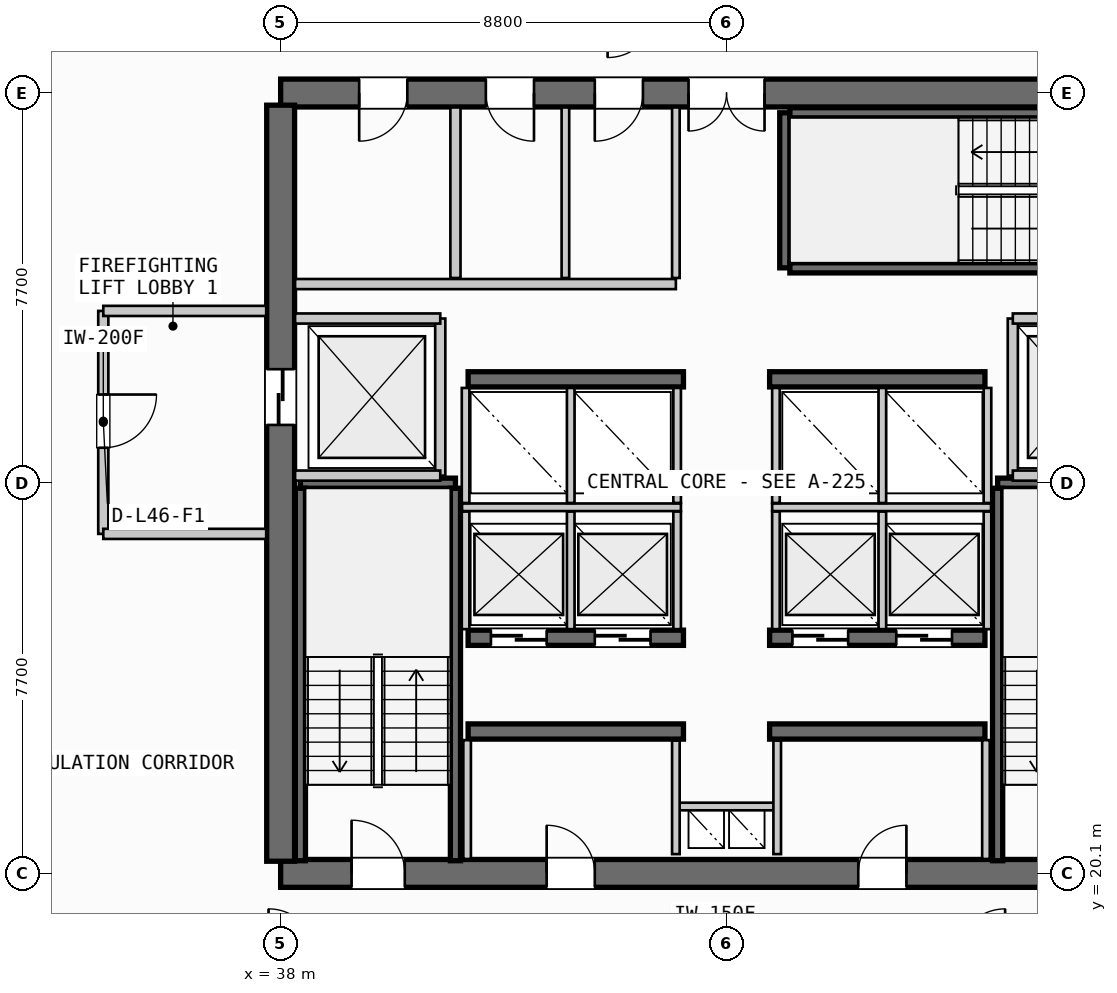
"""IFC4 building model, lengths in metres.
Left out: names, types, materials, properties, quantities, classifications, styles, units other than length and angle.
Written with IfcOpenShell. Run it as: python <this file> out.ifc"""

import sys

from ifc_helpers import new_model, si_unit, direction, frame, frame_2d, origin, place, context, subcontext, project, spatial, rectangle, extrude, source, transform, mapped, element, fill, save


model = new_model("IFC4")
c1 = context("Model", 3, precision=1e-05, world=origin(), true_north=direction((0.0, 1.0)))
c2 = subcontext(c1, "Body", "Model", "MODEL_VIEW")
j1 = project(units=[si_unit("LENGTHUNIT", "METRE"), si_unit("PLANEANGLEUNIT", "RADIAN")], contexts=[c1])
p1 = place(None, origin())
s1 = spatial("IfcSite", under=j1, at=p1, CompositionType="ELEMENT")
p2 = place(p1, origin())
s2 = spatial("IfcBuilding", under=s1, at=p2, CompositionType="ELEMENT")
p3 = place(p2, frame((0.0, 0.0, 179.9)))
s3 = spatial("IfcBuildingStorey", under=s2, at=p3, CompositionType="ELEMENT", Elevation=179.9)
p4 = place(p3, frame((38.0, 20.1, 0.0), z_axis=(0.0, 0.0, 1.0), x_axis=(1.0, 0.0, 0.0)))
e1 = element("IfcWall", 1, at=p4, inside=s3, PredefinedType="SHEAR", context=c2, shape_type="SweptSolid", body=[
    extrude(rectangle(XDim=17.6, YDim=0.55, at=frame_2d((8.8, 0.0))), origin(), (0.0, 0.0, 1.0), 3.26),
])
p5 = place(p4, frame((1.4, 0.0, 0.0)))
e2 = element("IfcOpeningElement", 2, at=p5, cuts=e1, PredefinedType="OPENING", context=c2, shape_type="SweptSolid", body=[
    extrude(rectangle(XDim=1.05, YDim=2.15, at=frame_2d((0.525, 1.075))), frame((0.0, 0.285, 0.0), z_axis=(0.0, -1.0, 0.0), x_axis=(1.0, 0.0, 0.0)), (0.0, 0.0, 1.0), 0.57),
])
p6 = place(p4, frame((15.15, 0.0, 0.0)))
e3 = element("IfcOpeningElement", 3, at=p6, cuts=e1, PredefinedType="OPENING", context=c2, shape_type="SweptSolid", body=[
    extrude(rectangle(XDim=1.05, YDim=2.15, at=frame_2d((0.525, 1.075))), frame((0.0, 0.285, 0.0), z_axis=(0.0, -1.0, 0.0), x_axis=(1.0, 0.0, 0.0)), (0.0, 0.0, 1.0), 0.57),
])
p7 = place(p4, frame((5.25, 0.0, 0.0)))
e4 = element("IfcOpeningElement", 4, at=p7, cuts=e1, PredefinedType="OPENING", context=c2, shape_type="SweptSolid", body=[
    extrude(rectangle(XDim=0.95, YDim=2.15, at=frame_2d((0.475, 1.075))), frame((0.0, 0.285, 0.0), z_axis=(0.0, -1.0, 0.0), x_axis=(1.0, 0.0, 0.0)), (0.0, 0.0, 1.0), 0.57),
])
p8 = place(p4, frame((11.4, 0.0, 0.0)))
e5 = element("IfcOpeningElement", 5, at=p8, cuts=e1, PredefinedType="OPENING", context=c2, shape_type="SweptSolid", body=[
    extrude(rectangle(XDim=0.95, YDim=2.15, at=frame_2d((0.475, 1.075))), frame((0.0, 0.285, 0.0), z_axis=(0.0, -1.0, 0.0), x_axis=(1.0, 0.0, 0.0)), (0.0, 0.0, 1.0), 0.57),
])
p9 = place(p3, frame((55.6, 35.5, 0.0), z_axis=(0.0, 0.0, 1.0), x_axis=(-1.0, 0.0, 0.0)))
e6 = element("IfcWall", 6, at=p9, inside=s3, PredefinedType="SHEAR", context=c2, shape_type="SweptSolid", body=[
    extrude(rectangle(XDim=17.6, YDim=0.55, at=frame_2d((8.8, 0.0))), origin(), (0.0, 0.0, 1.0), 3.26),
])
p10 = place(p9, frame((8.05, 0.0, 0.0)))
e7 = element("IfcOpeningElement", 7, at=p10, cuts=e6, PredefinedType="OPENING", context=c2, shape_type="SweptSolid", body=[
    extrude(rectangle(XDim=1.5, YDim=2.2, at=frame_2d((0.75, 1.1))), frame((0.0, 0.285, 0.0), z_axis=(0.0, -1.0, 0.0), x_axis=(1.0, 0.0, 0.0)), (0.0, 0.0, 1.0), 0.57),
])
p11 = place(p9, frame((15.1, 0.0, 0.0)))
e8 = element("IfcOpeningElement", 8, at=p11, cuts=e6, PredefinedType="OPENING", context=c2, shape_type="SweptSolid", body=[
    extrude(rectangle(XDim=0.95, YDim=2.15, at=frame_2d((0.475, 1.075))), frame((0.0, 0.285, 0.0), z_axis=(0.0, -1.0, 0.0), x_axis=(1.0, 0.0, 0.0)), (0.0, 0.0, 1.0), 0.57),
])
p12 = place(p9, frame((12.6, 0.0, 0.0)))
e9 = element("IfcOpeningElement", 9, at=p12, cuts=e6, PredefinedType="OPENING", context=c2, shape_type="SweptSolid", body=[
    extrude(rectangle(XDim=0.95, YDim=2.15, at=frame_2d((0.475, 1.075))), frame((0.0, 0.285, 0.0), z_axis=(0.0, -1.0, 0.0), x_axis=(1.0, 0.0, 0.0)), (0.0, 0.0, 1.0), 0.57),
])
p13 = place(p9, frame((10.45, 0.0, 0.0)))
e10 = element("IfcOpeningElement", 10, at=p13, cuts=e6, PredefinedType="OPENING", context=c2, shape_type="SweptSolid", body=[
    extrude(rectangle(XDim=0.95, YDim=2.15, at=frame_2d((0.475, 1.075))), frame((0.0, 0.285, 0.0), z_axis=(0.0, -1.0, 0.0), x_axis=(1.0, 0.0, 0.0)), (0.0, 0.0, 1.0), 0.57),
])
p14 = place(p3, frame((38.0, 35.26, 0.0), z_axis=(0.0, 0.0, 1.0), x_axis=(0.0, -1.0, 0.0)))
e11 = element("IfcWall", 11, at=p14, inside=s3, PredefinedType="SHEAR", context=c2, shape_type="SweptSolid", body=[
    extrude(rectangle(XDim=14.92, YDim=0.55, at=frame_2d((7.46, 0.0))), origin(), (0.0, 0.0, 1.0), 3.26),
])
p15 = place(p14, frame((5.21, 0.0, 0.0)))
e12 = element("IfcOpeningElement", 12, at=p15, cuts=e11, PredefinedType="OPENING", context=c2, shape_type="SweptSolid", body=[
    extrude(rectangle(XDim=1.1, YDim=2.2, at=frame_2d((0.55, 1.1))), frame((0.0, 0.285, 0.0), z_axis=(0.0, -1.0, 0.0), x_axis=(1.0, 0.0, 0.0)), (0.0, 0.0, 1.0), 0.57),
])
for number, where, z_axis, x_axis in (
    (13, (41.7, 22.9, 0.0), (0.0, 0.0, 1.0), (1.0, 0.0, 0.0)),
    (14, (47.65, 22.9, 0.0), (0.0, 0.0, 1.0), (1.0, 0.0, 0.0)),
):
    element("IfcWall", number, at=place(p3, frame(where, z_axis=z_axis, x_axis=x_axis)), inside=s3, PredefinedType="SHEAR", context=c2, shape_type="SweptSolid", body=[
        extrude(rectangle(XDim=4.25, YDim=0.3, at=frame_2d((2.125, 0.0))), origin(), (0.0, 0.0, 1.0), 3.26),
    ])
p16 = place(p3, frame((41.7, 24.75, 0.0), z_axis=(0.0, 0.0, 1.0), x_axis=(1.0, 0.0, 0.0)))
e15 = element("IfcWall", 15, at=p16, inside=s3, PredefinedType="SHEAR", context=c2, shape_type="SweptSolid", body=[
    extrude(rectangle(XDim=4.25, YDim=0.3, at=frame_2d((2.125, 0.0))), origin(), (0.0, 0.0, 1.0), 3.26),
])
p17 = place(p16, frame((0.45, 0.0, 0.0)))
e16 = element("IfcOpeningElement", 16, at=p17, cuts=e15, PredefinedType="OPENING", context=c2, shape_type="SweptSolid", body=[
    extrude(rectangle(XDim=1.1, YDim=2.2, at=frame_2d((0.55, 1.1))), frame((0.0, 0.16, 0.0), z_axis=(0.0, -1.0, 0.0), x_axis=(1.0, 0.0, 0.0)), (0.0, 0.0, 1.0), 0.32),
])
p18 = place(p16, frame((2.5, 0.0, 0.0)))
e17 = element("IfcOpeningElement", 17, at=p18, cuts=e15, PredefinedType="OPENING", context=c2, shape_type="SweptSolid", body=[
    extrude(rectangle(XDim=1.1, YDim=2.2, at=frame_2d((0.55, 1.1))), frame((0.0, 0.16, 0.0), z_axis=(0.0, -1.0, 0.0), x_axis=(1.0, 0.0, 0.0)), (0.0, 0.0, 1.0), 0.32),
])
p19 = place(p3, frame((47.65, 24.75, 0.0), z_axis=(0.0, 0.0, 1.0), x_axis=(1.0, 0.0, 0.0)))
e18 = element("IfcWall", 18, at=p19, inside=s3, PredefinedType="SHEAR", context=c2, shape_type="SweptSolid", body=[
    extrude(rectangle(XDim=4.25, YDim=0.3, at=frame_2d((2.125, 0.0))), origin(), (0.0, 0.0, 1.0), 3.26),
])
p20 = place(p19, frame((0.45, 0.0, 0.0)))
e19 = element("IfcOpeningElement", 19, at=p20, cuts=e18, PredefinedType="OPENING", context=c2, shape_type="SweptSolid", body=[
    extrude(rectangle(XDim=1.1, YDim=2.2, at=frame_2d((0.55, 1.1))), frame((0.0, 0.16, 0.0), z_axis=(0.0, -1.0, 0.0), x_axis=(1.0, 0.0, 0.0)), (0.0, 0.0, 1.0), 0.32),
])
p21 = place(p19, frame((2.5, 0.0, 0.0)))
e20 = element("IfcOpeningElement", 20, at=p21, cuts=e18, PredefinedType="OPENING", context=c2, shape_type="SweptSolid", body=[
    extrude(rectangle(XDim=1.1, YDim=2.2, at=frame_2d((0.55, 1.1))), frame((0.0, 0.16, 0.0), z_axis=(0.0, -1.0, 0.0), x_axis=(1.0, 0.0, 0.0)), (0.0, 0.0, 1.0), 0.32),
])
for number, where, z_axis, x_axis in (
    (21, (41.7, 29.85, 0.0), (0.0, 0.0, 1.0), (1.0, 0.0, 0.0)),
    (22, (47.65, 29.85, 0.0), (0.0, 0.0, 1.0), (1.0, 0.0, 0.0)),
):
    element("IfcWall", number, at=place(p3, frame(where, z_axis=z_axis, x_axis=x_axis)), inside=s3, PredefinedType="SHEAR", context=c2, shape_type="SweptSolid", body=[
        extrude(rectangle(XDim=4.25, YDim=0.3, at=frame_2d((2.125, 0.0))), origin(), (0.0, 0.0, 1.0), 3.26),
    ])
p22 = place(p3, frame((38.39, 27.8, 0.0), z_axis=(0.0, 0.0, 1.0), x_axis=(1.0, 0.0, 0.0)))
e23 = element("IfcWall", 23, at=p22, inside=s3, PredefinedType="SHEAR", context=c2, shape_type="SweptSolid", body=[
    extrude(rectangle(XDim=3.06, YDim=0.2, at=frame_2d((1.53, 0.0))), origin(), (0.0, 0.0, 1.0), 3.26),
])
for number, where, z_axis, x_axis in (
    (24, (41.45, 27.7, 0.0), (0.0, 0.0, 1.0), (0.0, -1.0, 0.0)),
    (25, (38.39, 20.35, 0.0), (0.0, 0.0, 1.0), (0.0, 1.0, 0.0)),
):
    element("IfcWall", number, at=place(p3, frame(where, z_axis=z_axis, x_axis=x_axis)), inside=s3, PredefinedType="SHEAR", context=c2, shape_type="SweptSolid", body=[
        extrude(rectangle(XDim=7.35, YDim=0.2, at=frame_2d((3.675, 0.0))), origin(), (0.0, 0.0, 1.0), 3.26),
    ])
p23 = place(p3, frame((52.15, 27.8, 0.0), z_axis=(0.0, 0.0, 1.0), x_axis=(1.0, 0.0, 0.0)))
e26 = element("IfcWall", 26, at=p23, inside=s3, PredefinedType="SHEAR", context=c2, shape_type="SweptSolid", body=[
    extrude(rectangle(XDim=3.06, YDim=0.2, at=frame_2d((1.53, 0.0))), origin(), (0.0, 0.0, 1.0), 3.26),
])
p24 = place(p3, frame((52.15, 20.35, 0.0), z_axis=(0.0, 0.0, 1.0), x_axis=(0.0, 1.0, 0.0)))
e27 = element("IfcWall", 27, at=p24, inside=s3, PredefinedType="SHEAR", context=c2, shape_type="SweptSolid", body=[
    extrude(rectangle(XDim=7.35, YDim=0.2, at=frame_2d((3.675, 0.0))), origin(), (0.0, 0.0, 1.0), 3.26),
])
p25 = place(p3, frame((47.95, 32.05, 0.0), z_axis=(0.0, 0.0, 1.0), x_axis=(0.0, 1.0, 0.0)))
e28 = element("IfcWall", 28, at=p25, inside=s3, PredefinedType="SHEAR", context=c2, shape_type="SweptSolid", body=[
    extrude(rectangle(XDim=3.06, YDim=0.2, at=frame_2d((1.53, 0.0))), origin(), (0.0, 0.0, 1.0), 3.26),
])
for number, where, z_axis, x_axis in (
    (29, (48.05, 35.11, 0.0), (0.0, 0.0, 1.0), (1.0, 0.0, 0.0)),
    (30, (55.4, 32.05, 0.0), (0.0, 0.0, 1.0), (-1.0, 0.0, 0.0)),
):
    element("IfcWall", number, at=place(p3, frame(where, z_axis=z_axis, x_axis=x_axis)), inside=s3, PredefinedType="SHEAR", context=c2, shape_type="SweptSolid", body=[
        extrude(rectangle(XDim=7.35, YDim=0.2, at=frame_2d((3.675, 0.0))), origin(), (0.0, 0.0, 1.0), 3.26),
    ])
p26 = place(p3, frame((45.8, 21.42, 0.0), z_axis=(0.0, 0.0, 1.0), x_axis=(1.0, 0.0, 0.0)))
e31 = element("IfcWall", 31, at=p26, inside=s3, PredefinedType="PARTITIONING", context=c2, shape_type="SweptSolid", body=[
    extrude(rectangle(XDim=2.0, YDim=0.15, at=frame_2d((1.0, 0.0))), origin(), (0.0, 0.0, 1.0), 2.28),
])
for number, where, z_axis, x_axis in (
    (32, (45.8, 20.48, 0.0), (0.0, 0.0, 1.0), (0.0, 1.0, 0.0)),
    (33, (47.8, 20.48, 0.0), (0.0, 0.0, 1.0), (0.0, 1.0, 0.0)),
):
    element("IfcWall", number, at=place(p3, frame(where, z_axis=z_axis, x_axis=x_axis)), inside=s3, PredefinedType="PARTITIONING", context=c2, shape_type="SweptSolid", body=[
        extrude(rectangle(XDim=2.24, YDim=0.15, at=frame_2d((1.12, 0.0))), origin(), (0.0, 0.0, 1.0), 2.28),
    ])
p27 = place(p3, frame((41.15, 27.95, 0.0), z_axis=(0.0, 0.0, 1.0), x_axis=(0.0, 1.0, 0.0)))
e34 = element("IfcWall", 34, at=p27, inside=s3, PredefinedType="PARTITIONING", context=c2, shape_type="SweptSolid", body=[
    extrude(rectangle(XDim=3.1, YDim=0.2, at=frame_2d((1.55, 0.0))), origin(), (0.0, 0.0, 1.0), 2.28),
])
for number, where, z_axis, x_axis in (
    (35, (38.285, 27.95, 0.0), (0.0, 0.0, 1.0), (1.0, 0.0, 0.0)),
    (36, (38.285, 31.05, 0.0), (0.0, 0.0, 1.0), (1.0, 0.0, 0.0)),
):
    element("IfcWall", number, at=place(p3, frame(where, z_axis=z_axis, x_axis=x_axis)), inside=s3, PredefinedType="PARTITIONING", context=c2, shape_type="SweptSolid", body=[
        extrude(rectangle(XDim=2.865, YDim=0.2, at=frame_2d((1.433, 0.0))), origin(), (0.0, 0.0, 1.0), 2.28),
    ])
p28 = place(p3, frame((34.5, 31.2, 0.0), z_axis=(0.0, 0.0, 1.0), x_axis=(0.0, -1.0, 0.0)))
e37 = element("IfcWall", 37, at=p28, inside=s3, PredefinedType="PARTITIONING", context=c2, shape_type="SweptSolid", body=[
    extrude(rectangle(XDim=4.4, YDim=0.2, at=frame_2d((2.2, 0.0))), origin(), (0.0, 0.0, 1.0), 2.28),
])
p29 = place(p28, frame((1.65, 0.0, 0.0)))
e38 = element("IfcOpeningElement", 38, at=p29, cuts=e37, PredefinedType="OPENING", context=c2, shape_type="SweptSolid", body=[
    extrude(rectangle(XDim=1.05, YDim=2.15, at=frame_2d((0.525, 1.075))), frame((0.0, 0.11, 0.0), z_axis=(0.0, -1.0, 0.0), x_axis=(1.0, 0.0, 0.0)), (0.0, 0.0, 1.0), 0.22),
])
for number, where, z_axis, x_axis in (
    (39, (34.5, 26.8, 0.0), (0.0, 0.0, 1.0), (1.0, 0.0, 0.0)),
    (40, (34.5, 31.2, 0.0), (0.0, 0.0, 1.0), (1.0, 0.0, 0.0)),
):
    element("IfcWall", number, at=place(p3, frame(where, z_axis=z_axis, x_axis=x_axis)), inside=s3, PredefinedType="PARTITIONING", context=c2, shape_type="SweptSolid", body=[
        extrude(rectangle(XDim=3.215, YDim=0.2, at=frame_2d((1.607, 0.0))), origin(), (0.0, 0.0, 1.0), 2.28),
    ])
p30 = place(p3, frame((52.45, 27.95, 0.0), z_axis=(0.0, 0.0, 1.0), x_axis=(0.0, 1.0, 0.0)))
e41 = element("IfcWall", 41, at=p30, inside=s3, PredefinedType="PARTITIONING", context=c2, shape_type="SweptSolid", body=[
    extrude(rectangle(XDim=3.1, YDim=0.2, at=frame_2d((1.55, 0.0))), origin(), (0.0, 0.0, 1.0), 2.28),
])
for number, where, z_axis, x_axis in (
    (42, (52.45, 27.95, 0.0), (0.0, 0.0, 1.0), (1.0, 0.0, 0.0)),
    (43, (52.45, 31.05, 0.0), (0.0, 0.0, 1.0), (1.0, 0.0, 0.0)),
):
    element("IfcWall", number, at=place(p3, frame(where, z_axis=z_axis, x_axis=x_axis)), inside=s3, PredefinedType="PARTITIONING", context=c2, shape_type="SweptSolid", body=[
        extrude(rectangle(XDim=2.865, YDim=0.2, at=frame_2d((1.433, 0.0))), origin(), (0.0, 0.0, 1.0), 2.28),
    ])
for number, where, z_axis, x_axis in (
    (44, (41.68, 20.385, 0.0), (0.0, 0.0, 1.0), (0.0, 1.0, 0.0)),
    (45, (51.92, 20.385, 0.0), (0.0, 0.0, 1.0), (0.0, 1.0, 0.0)),
):
    element("IfcWall", number, at=place(p3, frame(where, z_axis=z_axis, x_axis=x_axis)), inside=s3, PredefinedType="PARTITIONING", context=c2, shape_type="SweptSolid", body=[
        extrude(rectangle(XDim=2.345, YDim=0.15, at=frame_2d((1.172, 0.0))), origin(), (0.0, 0.0, 1.0), 2.28),
    ])
p31 = place(p3, frame((41.58, 27.325, 0.0), z_axis=(0.0, 0.0, 1.0), x_axis=(1.0, 0.0, 0.0)))
e46 = element("IfcWall", 46, at=p31, inside=s3, PredefinedType="PARTITIONING", context=c2, shape_type="SweptSolid", body=[
    extrude(rectangle(XDim=4.32, YDim=0.15, at=frame_2d((2.16, 0.0))), origin(), (0.0, 0.0, 1.0), 2.28),
])
p32 = place(p3, frame((47.7, 27.325, 0.0), z_axis=(0.0, 0.0, 1.0), x_axis=(1.0, 0.0, 0.0)))
e47 = element("IfcWall", 47, at=p32, inside=s3, PredefinedType="PARTITIONING", context=c2, shape_type="SweptSolid", body=[
    extrude(rectangle(XDim=4.32, YDim=0.15, at=frame_2d((2.16, 0.0))), origin(), (0.0, 0.0, 1.0), 2.28),
])
for number, where, z_axis, x_axis in (
    (48, (41.65, 24.92, 0.0), (0.0, 0.0, 1.0), (0.0, 1.0, 0.0)),
    (49, (43.725, 24.92, 0.0), (0.0, 0.0, 1.0), (0.0, 1.0, 0.0)),
    (50, (45.825, 24.92, 0.0), (0.0, 0.0, 1.0), (0.0, 1.0, 0.0)),
    (51, (47.775, 24.92, 0.0), (0.0, 0.0, 1.0), (0.0, 1.0, 0.0)),
    (52, (49.875, 24.92, 0.0), (0.0, 0.0, 1.0), (0.0, 1.0, 0.0)),
    (53, (51.95, 24.92, 0.0), (0.0, 0.0, 1.0), (0.0, 1.0, 0.0)),
):
    element("IfcWall", number, at=place(p3, frame(where, z_axis=z_axis, x_axis=x_axis)), inside=s3, PredefinedType="PARTITIONING", context=c2, shape_type="SweptSolid", body=[
        extrude(rectangle(XDim=2.32, YDim=0.15, at=frame_2d((1.16, 0.0))), origin(), (0.0, 0.0, 1.0), 2.28),
    ])
for number, where, z_axis, x_axis in (
    (54, (41.65, 27.41, 0.0), (0.0, 0.0, 1.0), (0.0, 1.0, 0.0)),
    (55, (43.725, 27.41, 0.0), (0.0, 0.0, 1.0), (0.0, 1.0, 0.0)),
    (56, (45.825, 27.41, 0.0), (0.0, 0.0, 1.0), (0.0, 1.0, 0.0)),
    (57, (47.775, 27.41, 0.0), (0.0, 0.0, 1.0), (0.0, 1.0, 0.0)),
    (58, (49.875, 27.41, 0.0), (0.0, 0.0, 1.0), (0.0, 1.0, 0.0)),
    (59, (51.95, 27.41, 0.0), (0.0, 0.0, 1.0), (0.0, 1.0, 0.0)),
):
    element("IfcWall", number, at=place(p3, frame(where, z_axis=z_axis, x_axis=x_axis)), inside=s3, PredefinedType="PARTITIONING", context=c2, shape_type="SweptSolid", body=[
        extrude(rectangle(XDim=2.27, YDim=0.15, at=frame_2d((1.135, 0.0))), origin(), (0.0, 0.0, 1.0), 2.28),
    ])
p33 = place(p3, frame((41.45, 31.85, 0.0), z_axis=(0.0, 0.0, 1.0), x_axis=(0.0, 1.0, 0.0)))
e60 = element("IfcWall", 60, at=p33, inside=s3, PredefinedType="PARTITIONING", context=c2, shape_type="SweptSolid", body=[
    extrude(rectangle(XDim=3.365, YDim=0.2, at=frame_2d((1.683, 0.0))), origin(), (0.0, 0.0, 1.0), 2.28),
])
p34 = place(p3, frame((38.285, 31.73, 0.0), z_axis=(0.0, 0.0, 1.0), x_axis=(1.0, 0.0, 0.0)))
e61 = element("IfcWall", 61, at=p34, inside=s3, PredefinedType="PARTITIONING", context=c2, shape_type="SweptSolid", body=[
    extrude(rectangle(XDim=7.515, YDim=0.2, at=frame_2d((3.758, 0.0))), origin(), (0.0, 0.0, 1.0), 2.28),
])
p35 = place(p3, frame((45.8, 31.85, 0.0), z_axis=(0.0, 0.0, 1.0), x_axis=(0.0, 1.0, 0.0)))
e62 = element("IfcWall", 62, at=p35, inside=s3, PredefinedType="PARTITIONING", context=c2, shape_type="SweptSolid", body=[
    extrude(rectangle(XDim=3.365, YDim=0.15, at=frame_2d((1.683, 0.0))), origin(), (0.0, 0.0, 1.0), 2.28),
])
p36 = place(p3, frame((43.62, 31.85, 0.0), z_axis=(0.0, 0.0, 1.0), x_axis=(0.0, 1.0, 0.0)))
e63 = element("IfcWall", 63, at=p36, inside=s3, PredefinedType="PLUMBINGWALL", context=c2, shape_type="SweptSolid", body=[
    extrude(rectangle(XDim=3.365, YDim=0.15, at=frame_2d((1.683, 0.0))), origin(), (0.0, 0.0, 1.0), 2.28),
])
m1 = source(origin(), c2, "Body", "SweptSolid", [
    extrude(rectangle(XDim=1.05, YDim=2.15, at=frame_2d((0.525, 1.075))), frame((0.0, 0.025, 0.0), z_axis=(0.0, -1.0, 0.0), x_axis=(1.0, 0.0, 0.0)), (0.0, 0.0, 1.0), 0.05),
])
p37 = place(p5, origin())
e64 = element("IfcDoor", 64, at=p37, inside=s3, OperationType="SINGLE_SWING_LEFT", PredefinedType="DOOR", context=c2, shape_type="MappedRepresentation", body=[
    mapped(m1, transform((0.0, 0.0, 0.0), scale=1.0)),
])
fill(e2, e64)
m2 = source(origin(), c2, "Body", "SweptSolid", [
    extrude(rectangle(XDim=1.5, YDim=2.2, at=frame_2d((0.75, 1.1))), frame((0.0, 0.025, 0.0), z_axis=(0.0, -1.0, 0.0), x_axis=(1.0, 0.0, 0.0)), (0.0, 0.0, 1.0), 0.05),
])
p38 = place(p10, origin())
e65 = element("IfcDoor", 65, at=p38, inside=s3, OperationType="DOUBLE_DOOR_SINGLE_SWING", PredefinedType="DOOR", context=c2, shape_type="MappedRepresentation", body=[
    mapped(m2, transform((0.0, 0.0, 0.0), scale=1.0)),
])
fill(e7, e65)
m3 = source(origin(), c2, "Body", "SweptSolid", [
    extrude(rectangle(XDim=1.1, YDim=2.2, at=frame_2d((0.55, 1.1))), frame((0.0, 0.025, 0.0), z_axis=(0.0, -1.0, 0.0), x_axis=(1.0, 0.0, 0.0)), (0.0, 0.0, 1.0), 0.05),
])
p39 = place(p15, origin())
e66 = element("IfcDoor", 66, at=p39, inside=s3, OperationType="SLIDING_TO_LEFT", PredefinedType="DOOR", context=c2, shape_type="MappedRepresentation", body=[
    mapped(m3, transform((0.0, 0.0, 0.0), scale=1.0)),
])
fill(e12, e66)
m4 = source(origin(), c2, "Body", "SweptSolid", [
    extrude(rectangle(XDim=0.95, YDim=2.15, at=frame_2d((0.475, 1.075))), frame((0.0, 0.025, 0.0), z_axis=(0.0, -1.0, 0.0), x_axis=(1.0, 0.0, 0.0)), (0.0, 0.0, 1.0), 0.05),
])
p40 = place(p7, origin())
e67 = element("IfcDoor", 67, at=p40, inside=s3, OperationType="SINGLE_SWING_LEFT", PredefinedType="DOOR", context=c2, shape_type="MappedRepresentation", body=[
    mapped(m4, transform((0.0, 0.0, 0.0), scale=1.0)),
])
fill(e4, e67)
p41 = place(p8, origin())
e68 = element("IfcDoor", 68, at=p41, inside=s3, OperationType="SINGLE_SWING_RIGHT", PredefinedType="DOOR", context=c2, shape_type="MappedRepresentation", body=[
    mapped(m4, transform((0.0, 0.0, 0.0), scale=1.0)),
])
fill(e5, e68)
p42 = place(p17, origin())
e69 = element("IfcDoor", 69, at=p42, inside=s3, OperationType="SLIDING_TO_RIGHT", PredefinedType="DOOR", context=c2, shape_type="MappedRepresentation", body=[
    mapped(m3, transform((0.0, 0.0, 0.0), scale=1.0)),
])
fill(e16, e69)
p43 = place(p18, origin())
e70 = element("IfcDoor", 70, at=p43, inside=s3, OperationType="SLIDING_TO_RIGHT", PredefinedType="DOOR", context=c2, shape_type="MappedRepresentation", body=[
    mapped(m3, transform((0.0, 0.0, 0.0), scale=1.0)),
])
fill(e17, e70)
p44 = place(p20, origin())
e71 = element("IfcDoor", 71, at=p44, inside=s3, OperationType="SLIDING_TO_RIGHT", PredefinedType="DOOR", context=c2, shape_type="MappedRepresentation", body=[
    mapped(m3, transform((0.0, 0.0, 0.0), scale=1.0)),
])
fill(e19, e71)
p45 = place(p21, origin())
e72 = element("IfcDoor", 72, at=p45, inside=s3, OperationType="SLIDING_TO_RIGHT", PredefinedType="DOOR", context=c2, shape_type="MappedRepresentation", body=[
    mapped(m3, transform((0.0, 0.0, 0.0), scale=1.0)),
])
fill(e20, e72)
p46 = place(p11, origin())
e73 = element("IfcDoor", 73, at=p46, inside=s3, OperationType="SINGLE_SWING_RIGHT", PredefinedType="DOOR", context=c2, shape_type="MappedRepresentation", body=[
    mapped(m4, transform((0.0, 0.0, 0.0), scale=1.0)),
])
fill(e8, e73)
p47 = place(p12, origin())
e74 = element("IfcDoor", 74, at=p47, inside=s3, OperationType="SINGLE_SWING_LEFT", PredefinedType="DOOR", context=c2, shape_type="MappedRepresentation", body=[
    mapped(m4, transform((0.0, 0.0, 0.0), scale=1.0)),
])
fill(e9, e74)
p48 = place(p13, origin())
e75 = element("IfcDoor", 75, at=p48, inside=s3, OperationType="SINGLE_SWING_RIGHT", PredefinedType="DOOR", context=c2, shape_type="MappedRepresentation", body=[
    mapped(m4, transform((0.0, 0.0, 0.0), scale=1.0)),
])
fill(e10, e75)
p49 = place(p29, origin())
e76 = element("IfcDoor", 76, at=p49, inside=s3, OperationType="SINGLE_SWING_LEFT", PredefinedType="DOOR", context=c2, shape_type="MappedRepresentation", body=[
    mapped(m1, transform((0.0, 0.0, 0.0), scale=1.0)),
])
fill(e38, e76)
save(model, sys.argv[1])
